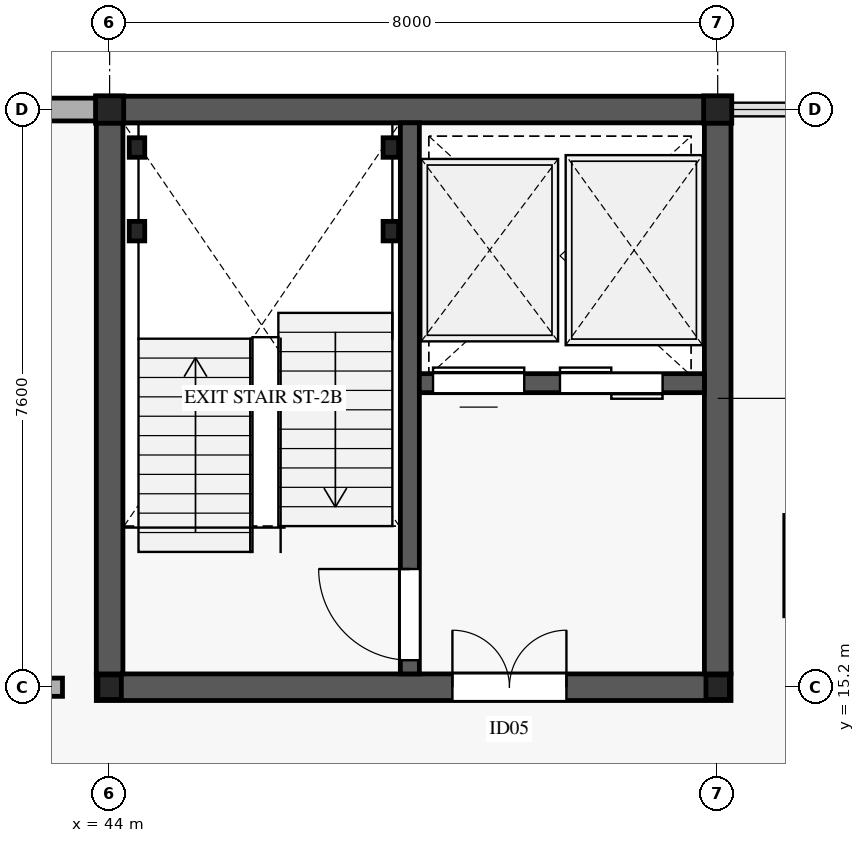
"""IFC4 building model, lengths in metres.
Left out: names, types, materials, properties, quantities, classifications, styles, units other than length and angle.
Written with IfcOpenShell. Run it as: python <this file> out.ifc"""

import sys

from ifc_helpers import new_model, si_unit, direction, frame, frame_2d, origin, origin_2d, place, context, subcontext, project, spatial, rectangle, i_section, extrude, element, fill, save


model = new_model("IFC4")
c1 = context("Model", 3, precision=1e-05, world=origin(), true_north=direction((0.0, 1.0)))
c2 = subcontext(c1, "Body", "Model", "MODEL_VIEW")
j1 = project(units=[si_unit("LENGTHUNIT", "METRE"), si_unit("PLANEANGLEUNIT", "RADIAN")], contexts=[c1])
p1 = place(None, origin())
s1 = spatial("IfcSite", under=j1, at=p1, CompositionType="ELEMENT")
p2 = place(p1, origin())
s2 = spatial("IfcBuilding", under=s1, at=p2, CompositionType="ELEMENT")
p3 = place(p2, frame((0.0, 0.0, 33.6)))
s3 = spatial("IfcBuildingStorey", under=s2, at=p3, CompositionType="ELEMENT", Elevation=33.6)
p4 = place(p3, frame((44.0, 15.2, 0.0), z_axis=(0.0, 0.0, 1.0), x_axis=(1.0, 0.0, 0.0)))
e1 = element("IfcColumn", 1, at=p4, inside=s3, PredefinedType="COLUMN", context=c2, shape_type="SweptSolid", body=[
    extrude(i_section(OverallWidth=0.309, OverallDepth=0.323, WebThickness=0.014, FlangeThickness=0.023, FilletRadius=0.015, at=origin_2d()), origin(), (0.0, 0.0, 1.0), 4.0),
])
p5 = place(p3, frame((44.0, 22.8, 0.0), z_axis=(0.0, 0.0, 1.0), x_axis=(1.0, 0.0, 0.0)))
e2 = element("IfcColumn", 2, at=p5, inside=s3, PredefinedType="COLUMN", context=c2, shape_type="SweptSolid", body=[
    extrude(i_section(OverallWidth=0.37, OverallDepth=0.36, WebThickness=0.012, FlangeThickness=0.02, FilletRadius=0.015, at=origin_2d()), origin(), (0.0, 0.0, 1.0), 4.0),
])
p6 = place(p3, frame((52.0, 15.2, 0.0), z_axis=(0.0, 0.0, 1.0), x_axis=(1.0, 0.0, 0.0)))
e3 = element("IfcColumn", 3, at=p6, inside=s3, PredefinedType="COLUMN", context=c2, shape_type="SweptSolid", body=[
    extrude(i_section(OverallWidth=0.309, OverallDepth=0.323, WebThickness=0.014, FlangeThickness=0.023, FilletRadius=0.015, at=origin_2d()), origin(), (0.0, 0.0, 1.0), 4.0),
])
p7 = place(p3, frame((52.0, 22.8, 0.0), z_axis=(0.0, 0.0, 1.0), x_axis=(1.0, 0.0, 0.0)))
e4 = element("IfcColumn", 4, at=p7, inside=s3, PredefinedType="COLUMN", context=c2, shape_type="SweptSolid", body=[
    extrude(i_section(OverallWidth=0.37, OverallDepth=0.36, WebThickness=0.012, FlangeThickness=0.02, FilletRadius=0.015, at=origin_2d()), origin(), (0.0, 0.0, 1.0), 4.0),
])
p8 = place(p3, frame((35.98, 22.8, 0.0), z_axis=(0.0, 0.0, 1.0), x_axis=(1.0, 0.0, 0.0)))
e5 = element("IfcWall", 5, at=p8, inside=s3, PredefinedType="STANDARD", context=c2, shape_type="SweptSolid", body=[
    extrude(rectangle(XDim=8.04, YDim=0.3, at=frame_2d((4.02, 0.0))), origin(), (0.0, 0.0, 1.0), 3.06),
])
p9 = place(p3, frame((52.94, 17.46, 0.0), z_axis=(0.0, 0.0, 1.0), x_axis=(0.0, -1.0, 0.0)))
e6 = element("IfcWall", 6, at=p9, inside=s3, PredefinedType="PARTITIONING", context=c2, shape_type="SweptSolid", body=[
    extrude(rectangle(XDim=1.32, YDim=0.115, at=frame_2d((0.66, 0.0))), origin(), (0.0, 0.0, 1.0), 3.15),
])
p10 = place(p3, frame((43.825, 15.2, 0.0), z_axis=(0.0, 0.0, 1.0), x_axis=(1.0, 0.0, 0.0)))
e7 = element("IfcWall", 7, at=p10, inside=s3, PredefinedType="SHEAR", context=c2, shape_type="SweptSolid", body=[
    extrude(rectangle(XDim=8.35, YDim=0.35, at=frame_2d((4.175, 0.0))), origin(), (0.0, 0.0, 1.0), 3.99),
])
p11 = place(p10, frame((4.685, 0.0, 0.0)))
e8 = element("IfcOpeningElement", 8, at=p11, cuts=e7, PredefinedType="OPENING", context=c2, shape_type="SweptSolid", body=[
    extrude(rectangle(XDim=1.5, YDim=2.2, at=frame_2d((0.75, 1.1))), frame((0.0, 0.185, 0.0), z_axis=(0.0, -1.0, 0.0), x_axis=(1.0, 0.0, 0.0)), (0.0, 0.0, 1.0), 0.37),
])
p12 = place(p3, frame((43.825, 22.8, 0.0), z_axis=(0.0, 0.0, 1.0), x_axis=(1.0, 0.0, 0.0)))
e9 = element("IfcWall", 9, at=p12, inside=s3, PredefinedType="SHEAR", context=c2, shape_type="SweptSolid", body=[
    extrude(rectangle(XDim=8.35, YDim=0.35, at=frame_2d((4.175, 0.0))), origin(), (0.0, 0.0, 1.0), 3.99),
])
for number, where, z_axis, x_axis in (
    (10, (44.0, 15.375, 0.0), (0.0, 0.0, 1.0), (0.0, 1.0, 0.0)),
    (11, (52.0, 15.375, 0.0), (0.0, 0.0, 1.0), (0.0, 1.0, 0.0)),
):
    element("IfcWall", number, at=place(p3, frame(where, z_axis=z_axis, x_axis=x_axis)), inside=s3, PredefinedType="SHEAR", context=c2, shape_type="SweptSolid", body=[
        extrude(rectangle(XDim=7.25, YDim=0.35, at=frame_2d((3.625, 0.0))), origin(), (0.0, 0.0, 1.0), 3.99),
    ])
p13 = place(p3, frame((47.95, 15.375, 0.0), z_axis=(0.0, 0.0, 1.0), x_axis=(0.0, 1.0, 0.0)))
e12 = element("IfcWall", 12, at=p13, inside=s3, PredefinedType="SHEAR", context=c2, shape_type="SweptSolid", body=[
    extrude(rectangle(XDim=7.25, YDim=0.25, at=frame_2d((3.625, 0.0))), origin(), (0.0, 0.0, 1.0), 3.99),
])
p14 = place(p13, frame((0.18, 0.0, 0.0)))
e13 = element("IfcOpeningElement", 13, at=p14, cuts=e12, PredefinedType="OPENING", context=c2, shape_type="SweptSolid", body=[
    extrude(rectangle(XDim=1.2, YDim=2.2, at=frame_2d((0.6, 1.1))), frame((0.0, 0.135, 0.0), z_axis=(0.0, -1.0, 0.0), x_axis=(1.0, 0.0, 0.0)), (0.0, 0.0, 1.0), 0.27),
])
p15 = place(p3, frame((48.075, 19.2, 0.0), z_axis=(0.0, 0.0, 1.0), x_axis=(1.0, 0.0, 0.0)))
e14 = element("IfcWall", 14, at=p15, inside=s3, PredefinedType="SHEAR", context=c2, shape_type="SweptSolid", body=[
    extrude(rectangle(XDim=3.75, YDim=0.25, at=frame_2d((1.875, 0.0))), origin(), (0.0, 0.0, 1.0), 3.99),
])
p16 = place(p15, frame((0.18, 0.0, 0.0)))
e15 = element("IfcOpeningElement", 15, at=p16, cuts=e14, PredefinedType="OPENING", context=c2, shape_type="SweptSolid", body=[
    extrude(rectangle(XDim=1.2, YDim=2.2, at=frame_2d((0.6, 1.1))), frame((0.0, 0.135, 0.0), z_axis=(0.0, -1.0, 0.0), x_axis=(1.0, 0.0, 0.0)), (0.0, 0.0, 1.0), 0.27),
])
p17 = place(p15, frame((1.85, 0.0, 0.0)))
e16 = element("IfcOpeningElement", 16, at=p17, cuts=e14, PredefinedType="OPENING", context=c2, shape_type="SweptSolid", body=[
    extrude(rectangle(XDim=1.35, YDim=2.2, at=frame_2d((0.675, 1.1))), frame((0.0, 0.135, 0.0), z_axis=(0.0, -1.0, 0.0), x_axis=(1.0, 0.0, 0.0)), (0.0, 0.0, 1.0), 0.27),
])
for number, where, z_axis, x_axis in (
    (17, (44.36, 21.2, 0.0), (0.0, 0.0, 1.0), (1.0, 0.0, 0.0)),
    (18, (47.7, 21.2, 0.0), (0.0, 0.0, 1.0), (1.0, 0.0, 0.0)),
    (19, (44.36, 22.3, 0.0), (0.0, 0.0, 1.0), (1.0, 0.0, 0.0)),
    (20, (47.7, 22.3, 0.0), (0.0, 0.0, 1.0), (1.0, 0.0, 0.0)),
):
    element("IfcColumn", number, at=place(p3, frame(where, z_axis=z_axis, x_axis=x_axis)), inside=s3, PredefinedType="COLUMN", context=c2, shape_type="SweptSolid", body=[
        extrude(i_section(OverallWidth=0.204, OverallDepth=0.257, WebThickness=0.009, FlangeThickness=0.016, FilletRadius=0.013, at=origin_2d()), origin(), (0.0, 0.0, 1.0), 4.195),
    ])
p18 = place(p3, frame((36.22, 15.2, 0.0), z_axis=(0.0, 0.0, 1.0), x_axis=(1.0, 0.0, 0.0)))
e21 = element("IfcWall", 21, at=p18, inside=s3, PredefinedType="PARTITIONING", context=c2, shape_type="SweptSolid", body=[
    extrude(rectangle(XDim=7.16, YDim=0.24, at=frame_2d((3.58, 0.0))), origin(), (0.0, 0.0, 1.0), 2.85),
])
p19 = place(p18, frame((3.03, 0.0, 0.0)))
e22 = element("IfcOpeningElement", 22, at=p19, cuts=e21, PredefinedType="OPENING", context=c2, shape_type="SweptSolid", body=[
    extrude(rectangle(XDim=1.1, YDim=2.3, at=frame_2d((0.55, 1.15))), frame((0.0, 0.13, 0.0), z_axis=(0.0, -1.0, 0.0), x_axis=(1.0, 0.0, 0.0)), (0.0, 0.0, 1.0), 0.26),
])
p20 = place(p14, origin())
e23 = element("IfcDoor", 23, at=p20, inside=s3, OperationType="SINGLE_SWING_RIGHT", PredefinedType="DOOR", context=c2, shape_type="SweptSolid", body=[
    extrude(rectangle(XDim=1.2, YDim=2.2, at=frame_2d((0.6, 1.1))), frame((0.0, 0.025, 0.0), z_axis=(0.0, -1.0, 0.0), x_axis=(1.0, 0.0, 0.0)), (0.0, 0.0, 1.0), 0.05),
])
fill(e13, e23)
p21 = place(p11, origin())
e24 = element("IfcDoor", 24, at=p21, inside=s3, OperationType="DOUBLE_DOOR_SINGLE_SWING", PredefinedType="DOOR", context=c2, shape_type="SweptSolid", body=[
    extrude(rectangle(XDim=1.5, YDim=2.2, at=frame_2d((0.75, 1.1))), frame((0.0, 0.025, 0.0), z_axis=(0.0, -1.0, 0.0), x_axis=(1.0, 0.0, 0.0)), (0.0, 0.0, 1.0), 0.05),
])
fill(e8, e24)
p22 = place(p16, origin())
e25 = element("IfcDoor", 25, at=p22, inside=s3, OperationType="SLIDING_TO_LEFT", PredefinedType="DOOR", context=c2, shape_type="SweptSolid", body=[
    extrude(rectangle(XDim=1.2, YDim=2.2, at=frame_2d((0.6, 1.1))), frame((0.0, 0.025, 0.0), z_axis=(0.0, -1.0, 0.0), x_axis=(1.0, 0.0, 0.0)), (0.0, 0.0, 1.0), 0.05),
])
fill(e15, e25)
p23 = place(p17, origin())
e26 = element("IfcDoor", 26, at=p23, inside=s3, OperationType="DOUBLE_DOOR_SLIDING", PredefinedType="DOOR", context=c2, shape_type="SweptSolid", body=[
    extrude(rectangle(XDim=1.35, YDim=2.2, at=frame_2d((0.675, 1.1))), frame((0.0, 0.025, 0.0), z_axis=(0.0, -1.0, 0.0), x_axis=(1.0, 0.0, 0.0)), (0.0, 0.0, 1.0), 0.05),
])
fill(e16, e26)
save(model, sys.argv[1])
